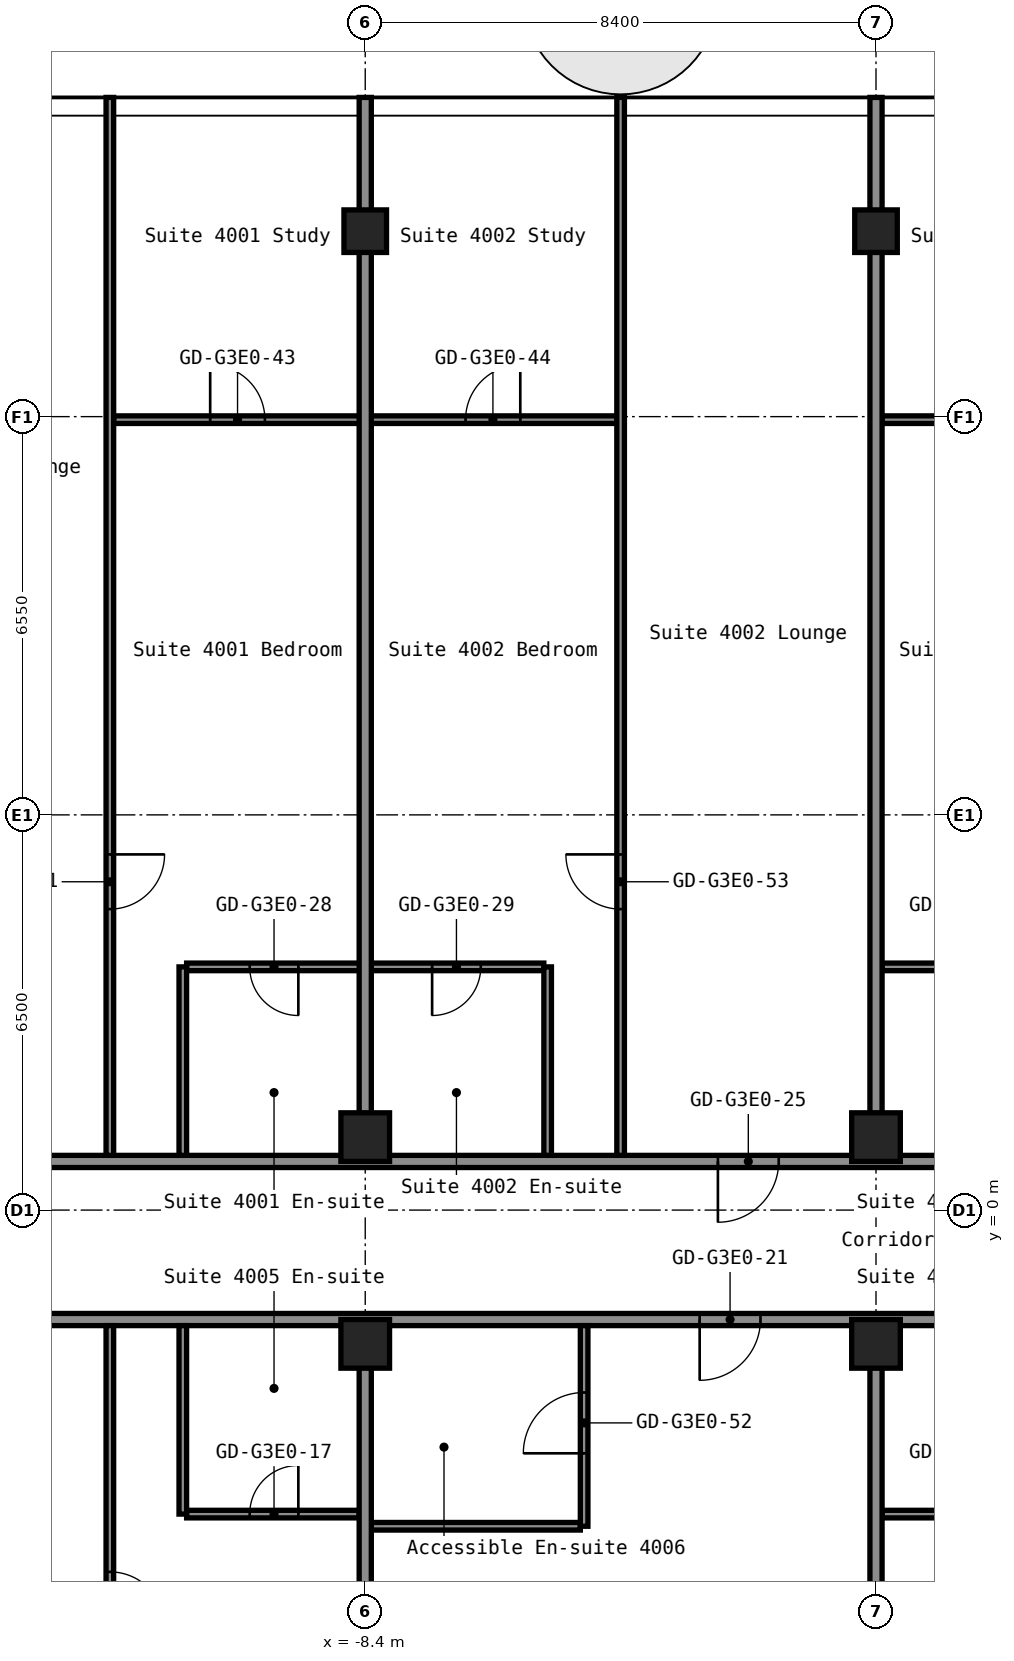
"""IFC4 building model, lengths in metres.
Left out: names, types, materials, properties, quantities, classifications, styles, units other than length and angle.
Written with IfcOpenShell. Run it as: python <this file> out.ifc"""

import sys

from ifc_helpers import new_model, si_unit, direction, frame, frame_2d, origin, origin_2d, place, context, subcontext, project, spatial, rectangle, hollow_rectangle, extrude, element, fill, save


model = new_model("IFC4")
c1 = context("Model", 3, precision=1e-05, world=origin(), true_north=direction((0.0, 1.0)))
c2 = subcontext(c1, "Body", "Model", "MODEL_VIEW")
j1 = project(units=[si_unit("LENGTHUNIT", "METRE"), si_unit("PLANEANGLEUNIT", "RADIAN")], contexts=[c1])
p1 = place(None, origin())
s1 = spatial("IfcSite", under=j1, at=p1, CompositionType="ELEMENT")
p2 = place(p1, origin())
s2 = spatial("IfcBuilding", under=s1, at=p2, CompositionType="ELEMENT")
p3 = place(p2, frame((0.0, 0.0, 143.8)))
s3 = spatial("IfcBuildingStorey", under=s2, at=p3, CompositionType="ELEMENT", Elevation=143.8)
for number, where, z_axis, x_axis in (
    (1, (-8.4, -2.2, 0.0), (0.0, 0.0, 1.0), (1.0, 0.0, 0.0)),
    (2, (-8.4, 1.2, 0.0), (0.0, 0.0, 1.0), (1.0, 0.0, 0.0)),
):
    element("IfcColumn", number, at=place(p3, frame(where, z_axis=z_axis, x_axis=x_axis)), inside=s3, PredefinedType="COLUMN", context=c2, shape_type="SweptSolid", body=[
        extrude(hollow_rectangle(XDim=0.8, YDim=0.8, WallThickness=0.032, at=origin_2d()), origin(), (0.0, 0.0, 1.0), 2.75),
    ])
p4 = place(p3, frame((-8.4, 16.1, 0.0), z_axis=(0.0, 0.0, 1.0), x_axis=(1.0, 0.0, 0.0)))
e3 = element("IfcColumn", 3, at=p4, inside=s3, PredefinedType="COLUMN", context=c2, shape_type="SweptSolid", body=[
    extrude(hollow_rectangle(XDim=0.7, YDim=0.7, WallThickness=0.028, at=origin_2d()), origin(), (0.0, 0.0, 1.0), 2.75),
])
for number, where, z_axis, x_axis in (
    (4, (0.0, -2.2, 0.0), (0.0, 0.0, 1.0), (1.0, 0.0, 0.0)),
    (5, (0.0, 1.2, 0.0), (0.0, 0.0, 1.0), (1.0, 0.0, 0.0)),
):
    element("IfcColumn", number, at=place(p3, frame(where, z_axis=z_axis, x_axis=x_axis)), inside=s3, PredefinedType="COLUMN", context=c2, shape_type="SweptSolid", body=[
        extrude(hollow_rectangle(XDim=0.8, YDim=0.8, WallThickness=0.032, at=origin_2d()), origin(), (0.0, 0.0, 1.0), 2.75),
    ])
p5 = place(p3, frame((0.0, 16.1, 0.0), z_axis=(0.0, 0.0, 1.0), x_axis=(1.0, 0.0, 0.0)))
e6 = element("IfcColumn", 6, at=p5, inside=s3, PredefinedType="COLUMN", context=c2, shape_type="SweptSolid", body=[
    extrude(hollow_rectangle(XDim=0.7, YDim=0.7, WallThickness=0.028, at=origin_2d()), origin(), (0.0, 0.0, 1.0), 2.75),
])
p6 = place(p3, frame((-8.3, -5.2, 0.0), z_axis=(0.0, 0.0, 1.0), x_axis=(1.0, 0.0, 0.0)))
e7 = element("IfcWall", 7, at=p6, inside=s3, PredefinedType="PARTITIONING", context=c2, shape_type="SweptSolid", body=[
    extrude(rectangle(XDim=3.438, YDim=0.125, at=frame_2d((1.719, 0.0))), origin(), (0.0, 0.0, 1.0), 2.75),
])
p7 = place(p3, frame((-11.337, -5.0, 0.0), z_axis=(0.0, 0.0, 1.0), x_axis=(1.0, 0.0, 0.0)))
e8 = element("IfcWall", 8, at=p7, inside=s3, PredefinedType="PARTITIONING", context=c2, shape_type="SweptSolid", body=[
    extrude(rectangle(XDim=2.837, YDim=0.125, at=frame_2d((1.419, 0.0))), origin(), (0.0, 0.0, 1.0), 2.75),
])
p8 = place(p7, frame((1.038, 0.0, 0.0)))
e9 = element("IfcOpeningElement", 9, at=p8, cuts=e8, PredefinedType="OPENING", context=c2, shape_type="SweptSolid", body=[
    extrude(rectangle(XDim=0.8, YDim=2.1, at=frame_2d((0.4, 1.05))), frame((0.0, 0.073, 0.0), z_axis=(0.0, -1.0, 0.0), x_axis=(1.0, 0.0, 0.0)), (0.0, 0.0, 1.0), 0.145),
])
p9 = place(p3, frame((0.1, -5.0, 0.0), z_axis=(0.0, 0.0, 1.0), x_axis=(1.0, 0.0, 0.0)))
e10 = element("IfcWall", 10, at=p9, inside=s3, PredefinedType="PARTITIONING", context=c2, shape_type="SweptSolid", body=[
    extrude(rectangle(XDim=2.837, YDim=0.125, at=frame_2d((1.419, 0.0))), origin(), (0.0, 0.0, 1.0), 2.75),
])
p10 = place(p9, frame((1.0, 0.0, 0.0)))
e11 = element("IfcOpeningElement", 11, at=p10, cuts=e10, PredefinedType="OPENING", context=c2, shape_type="SweptSolid", body=[
    extrude(rectangle(XDim=0.8, YDim=2.1, at=frame_2d((0.4, 1.05))), frame((0.0, 0.073, 0.0), z_axis=(0.0, -1.0, 0.0), x_axis=(1.0, 0.0, 0.0)), (0.0, 0.0, 1.0), 0.145),
])
p11 = place(p3, frame((-16.8, -1.8, 0.0), z_axis=(0.0, 0.0, 1.0), x_axis=(1.0, 0.0, 0.0)))
e12 = element("IfcWall", 12, at=p11, inside=s3, PredefinedType="PARTITIONING", context=c2, shape_type="SweptSolid", body=[
    extrude(rectangle(XDim=33.6, YDim=0.2, at=frame_2d((16.8, 0.0))), origin(), (0.0, 0.0, 1.0), 2.75),
])
p12 = place(p11, frame((1.6, 0.0, 0.0)))
e13 = element("IfcOpeningElement", 13, at=p12, cuts=e12, PredefinedType="OPENING", context=c2, shape_type="SweptSolid", body=[
    extrude(rectangle(XDim=1.0, YDim=2.1, at=frame_2d((0.5, 1.05))), frame((0.0, 0.11, 0.0), z_axis=(0.0, -1.0, 0.0), x_axis=(1.0, 0.0, 0.0)), (0.0, 0.0, 1.0), 0.22),
])
p13 = place(p11, frame((13.9, 0.0, 0.0)))
e14 = element("IfcOpeningElement", 14, at=p13, cuts=e12, PredefinedType="OPENING", context=c2, shape_type="SweptSolid", body=[
    extrude(rectangle(XDim=1.0, YDim=2.1, at=frame_2d((0.5, 1.05))), frame((0.0, 0.11, 0.0), z_axis=(0.0, -1.0, 0.0), x_axis=(1.0, 0.0, 0.0)), (0.0, 0.0, 1.0), 0.22),
])
p14 = place(p11, frame((22.6, 0.0, 0.0)))
e15 = element("IfcOpeningElement", 15, at=p14, cuts=e12, PredefinedType="OPENING", context=c2, shape_type="SweptSolid", body=[
    extrude(rectangle(XDim=1.0, YDim=2.1, at=frame_2d((0.5, 1.05))), frame((0.0, 0.11, 0.0), z_axis=(0.0, -1.0, 0.0), x_axis=(1.0, 0.0, 0.0)), (0.0, 0.0, 1.0), 0.22),
])
p15 = place(p11, frame((26.8, 0.0, 0.0)))
e16 = element("IfcOpeningElement", 16, at=p15, cuts=e12, PredefinedType="OPENING", context=c2, shape_type="SweptSolid", body=[
    extrude(rectangle(XDim=1.0, YDim=2.1, at=frame_2d((0.5, 1.05))), frame((0.0, 0.11, 0.0), z_axis=(0.0, -1.0, 0.0), x_axis=(1.0, 0.0, 0.0)), (0.0, 0.0, 1.0), 0.22),
])
p16 = place(p3, frame((-16.8, 0.8, 0.0), z_axis=(0.0, 0.0, 1.0), x_axis=(1.0, 0.0, 0.0)))
e17 = element("IfcWall", 17, at=p16, inside=s3, PredefinedType="PARTITIONING", context=c2, shape_type="SweptSolid", body=[
    extrude(rectangle(XDim=33.6, YDim=0.2, at=frame_2d((16.8, 0.0))), origin(), (0.0, 0.0, 1.0), 2.75),
])
p17 = place(p16, frame((1.6, 0.0, 0.0)))
e18 = element("IfcOpeningElement", 18, at=p17, cuts=e17, PredefinedType="OPENING", context=c2, shape_type="SweptSolid", body=[
    extrude(rectangle(XDim=1.0, YDim=2.1, at=frame_2d((0.5, 1.05))), frame((0.0, 0.11, 0.0), z_axis=(0.0, -1.0, 0.0), x_axis=(1.0, 0.0, 0.0)), (0.0, 0.0, 1.0), 0.22),
])
p18 = place(p16, frame((14.2, 0.0, 0.0)))
e19 = element("IfcOpeningElement", 19, at=p18, cuts=e17, PredefinedType="OPENING", context=c2, shape_type="SweptSolid", body=[
    extrude(rectangle(XDim=1.0, YDim=2.1, at=frame_2d((0.5, 1.05))), frame((0.0, 0.11, 0.0), z_axis=(0.0, -1.0, 0.0), x_axis=(1.0, 0.0, 0.0)), (0.0, 0.0, 1.0), 0.22),
])
p19 = place(p16, frame((22.6, 0.0, 0.0)))
e20 = element("IfcOpeningElement", 20, at=p19, cuts=e17, PredefinedType="OPENING", context=c2, shape_type="SweptSolid", body=[
    extrude(rectangle(XDim=1.0, YDim=2.1, at=frame_2d((0.5, 1.05))), frame((0.0, 0.11, 0.0), z_axis=(0.0, -1.0, 0.0), x_axis=(1.0, 0.0, 0.0)), (0.0, 0.0, 1.0), 0.22),
])
p20 = place(p16, frame((26.8, 0.0, 0.0)))
e21 = element("IfcOpeningElement", 21, at=p20, cuts=e17, PredefinedType="OPENING", context=c2, shape_type="SweptSolid", body=[
    extrude(rectangle(XDim=1.0, YDim=2.1, at=frame_2d((0.5, 1.05))), frame((0.0, 0.11, 0.0), z_axis=(0.0, -1.0, 0.0), x_axis=(1.0, 0.0, 0.0)), (0.0, 0.0, 1.0), 0.22),
])
p21 = place(p3, frame((-11.337, 4.0, 0.0), z_axis=(0.0, 0.0, 1.0), x_axis=(1.0, 0.0, 0.0)))
e22 = element("IfcWall", 22, at=p21, inside=s3, PredefinedType="PARTITIONING", context=c2, shape_type="SweptSolid", body=[
    extrude(rectangle(XDim=5.875, YDim=0.125, at=frame_2d((2.938, 0.0))), origin(), (0.0, 0.0, 1.0), 2.75),
])
p22 = place(p21, frame((1.038, 0.0, 0.0)))
e23 = element("IfcOpeningElement", 23, at=p22, cuts=e22, PredefinedType="OPENING", context=c2, shape_type="SweptSolid", body=[
    extrude(rectangle(XDim=0.8, YDim=2.1, at=frame_2d((0.4, 1.05))), frame((0.0, 0.073, 0.0), z_axis=(0.0, -1.0, 0.0), x_axis=(1.0, 0.0, 0.0)), (0.0, 0.0, 1.0), 0.145),
])
p23 = place(p21, frame((4.038, 0.0, 0.0)))
e24 = element("IfcOpeningElement", 24, at=p23, cuts=e22, PredefinedType="OPENING", context=c2, shape_type="SweptSolid", body=[
    extrude(rectangle(XDim=0.8, YDim=2.1, at=frame_2d((0.4, 1.05))), frame((0.0, 0.073, 0.0), z_axis=(0.0, -1.0, 0.0), x_axis=(1.0, 0.0, 0.0)), (0.0, 0.0, 1.0), 0.145),
])
p24 = place(p3, frame((0.1, 4.0, 0.0), z_axis=(0.0, 0.0, 1.0), x_axis=(1.0, 0.0, 0.0)))
e25 = element("IfcWall", 25, at=p24, inside=s3, PredefinedType="PARTITIONING", context=c2, shape_type="SweptSolid", body=[
    extrude(rectangle(XDim=2.837, YDim=0.125, at=frame_2d((1.419, 0.0))), origin(), (0.0, 0.0, 1.0), 2.75),
])
p25 = place(p24, frame((1.0, 0.0, 0.0)))
e26 = element("IfcOpeningElement", 26, at=p25, cuts=e25, PredefinedType="OPENING", context=c2, shape_type="SweptSolid", body=[
    extrude(rectangle(XDim=0.8, YDim=2.1, at=frame_2d((0.4, 1.05))), frame((0.0, 0.073, 0.0), z_axis=(0.0, -1.0, 0.0), x_axis=(1.0, 0.0, 0.0)), (0.0, 0.0, 1.0), 0.145),
])
p26 = place(p3, frame((-12.538, 13.0, 0.0), z_axis=(0.0, 0.0, 1.0), x_axis=(1.0, 0.0, 0.0)))
e27 = element("IfcWall", 27, at=p26, inside=s3, PredefinedType="PARTITIONING", context=c2, shape_type="SweptSolid", body=[
    extrude(rectangle(XDim=8.275, YDim=0.125, at=frame_2d((4.138, 0.0))), origin(), (0.0, 0.0, 1.0), 2.75),
])
p27 = place(p26, frame((1.587, 0.0, 0.0)))
e28 = element("IfcOpeningElement", 28, at=p27, cuts=e27, PredefinedType="OPENING", context=c2, shape_type="SweptSolid", body=[
    extrude(rectangle(XDim=0.9, YDim=2.1, at=frame_2d((0.45, 1.05))), frame((0.0, 0.073, 0.0), z_axis=(0.0, -1.0, 0.0), x_axis=(1.0, 0.0, 0.0)), (0.0, 0.0, 1.0), 0.145),
])
p28 = place(p26, frame((5.788, 0.0, 0.0)))
e29 = element("IfcOpeningElement", 29, at=p28, cuts=e27, PredefinedType="OPENING", context=c2, shape_type="SweptSolid", body=[
    extrude(rectangle(XDim=0.9, YDim=2.1, at=frame_2d((0.45, 1.05))), frame((0.0, 0.073, 0.0), z_axis=(0.0, -1.0, 0.0), x_axis=(1.0, 0.0, 0.0)), (0.0, 0.0, 1.0), 0.145),
])
p29 = place(p3, frame((0.1, 13.0, 0.0), z_axis=(0.0, 0.0, 1.0), x_axis=(1.0, 0.0, 0.0)))
e30 = element("IfcWall", 30, at=p29, inside=s3, PredefinedType="PARTITIONING", context=c2, shape_type="SweptSolid", body=[
    extrude(rectangle(XDim=4.037, YDim=0.125, at=frame_2d((2.019, 0.0))), origin(), (0.0, 0.0, 1.0), 2.75),
])
p30 = place(p29, frame((1.55, 0.0, 0.0)))
e31 = element("IfcOpeningElement", 31, at=p30, cuts=e30, PredefinedType="OPENING", context=c2, shape_type="SweptSolid", body=[
    extrude(rectangle(XDim=0.9, YDim=2.1, at=frame_2d((0.45, 1.05))), frame((0.0, 0.073, 0.0), z_axis=(0.0, -1.0, 0.0), x_axis=(1.0, 0.0, 0.0)), (0.0, 0.0, 1.0), 0.145),
])
p31 = place(p3, frame((-12.6, -19.3, 0.0), z_axis=(0.0, 0.0, 1.0), x_axis=(0.0, 1.0, 0.0)))
e32 = element("IfcWall", 32, at=p31, inside=s3, PredefinedType="PARTITIONING", context=c2, shape_type="SweptSolid", body=[
    extrude(rectangle(XDim=17.4, YDim=0.125, at=frame_2d((8.7, 0.0))), origin(), (0.0, 0.0, 1.0), 2.75),
])
p32 = place(p31, frame((12.45, 0.0, 0.0)))
e33 = element("IfcOpeningElement", 33, at=p32, cuts=e32, PredefinedType="OPENING", context=c2, shape_type="SweptSolid", body=[
    extrude(rectangle(XDim=0.9, YDim=2.1, at=frame_2d((0.45, 1.05))), frame((0.0, 0.073, 0.0), z_axis=(0.0, -1.0, 0.0), x_axis=(1.0, 0.0, 0.0)), (0.0, 0.0, 1.0), 0.145),
])
p33 = place(p3, frame((-12.6, 0.9, 0.0), z_axis=(0.0, 0.0, 1.0), x_axis=(0.0, 1.0, 0.0)))
e34 = element("IfcWall", 34, at=p33, inside=s3, PredefinedType="PARTITIONING", context=c2, shape_type="SweptSolid", body=[
    extrude(rectangle(XDim=17.4, YDim=0.125, at=frame_2d((8.7, 0.0))), origin(), (0.0, 0.0, 1.0), 2.75),
])
p34 = place(p33, frame((4.05, 0.0, 0.0)))
e35 = element("IfcOpeningElement", 35, at=p34, cuts=e34, PredefinedType="OPENING", context=c2, shape_type="SweptSolid", body=[
    extrude(rectangle(XDim=0.9, YDim=2.1, at=frame_2d((0.45, 1.05))), frame((0.0, 0.073, 0.0), z_axis=(0.0, -1.0, 0.0), x_axis=(1.0, 0.0, 0.0)), (0.0, 0.0, 1.0), 0.145),
])
for number, where, z_axis, x_axis in (
    (36, (-11.4, -5.0, 0.0), (0.0, 0.0, 1.0), (0.0, 1.0, 0.0)),
    (37, (-11.4, 0.9, 0.0), (0.0, 0.0, 1.0), (0.0, 1.0, 0.0)),
):
    element("IfcWall", number, at=place(p3, frame(where, z_axis=z_axis, x_axis=x_axis)), inside=s3, PredefinedType="PARTITIONING", context=c2, shape_type="SweptSolid", body=[
        extrude(rectangle(XDim=3.1, YDim=0.125, at=frame_2d((1.55, 0.0))), origin(), (0.0, 0.0, 1.0), 2.75),
    ])
for number, where, z_axis, x_axis in (
    (38, (-8.4, -19.3, 0.0), (0.0, 0.0, 1.0), (0.0, 1.0, 0.0)),
    (39, (-8.4, 1.59, 0.0), (0.0, 0.0, 1.0), (0.0, 1.0, 0.0)),
):
    element("IfcWall", number, at=place(p3, frame(where, z_axis=z_axis, x_axis=x_axis)), inside=s3, PredefinedType="PARTITIONING", context=c2, shape_type="SweptSolid", body=[
        extrude(rectangle(XDim=16.71, YDim=0.2, at=frame_2d((8.355, 0.0))), origin(), (0.0, 0.0, 1.0), 2.75),
    ])
p35 = place(p3, frame((-5.4, 0.9, 0.0), z_axis=(0.0, 0.0, 1.0), x_axis=(0.0, 1.0, 0.0)))
e40 = element("IfcWall", 40, at=p35, inside=s3, PredefinedType="PARTITIONING", context=c2, shape_type="SweptSolid", body=[
    extrude(rectangle(XDim=3.1, YDim=0.125, at=frame_2d((1.55, 0.0))), origin(), (0.0, 0.0, 1.0), 2.75),
])
p36 = place(p3, frame((-4.8, -5.2, 0.0), z_axis=(0.0, 0.0, 1.0), x_axis=(0.0, 1.0, 0.0)))
e41 = element("IfcWall", 41, at=p36, inside=s3, PredefinedType="PARTITIONING", context=c2, shape_type="SweptSolid", body=[
    extrude(rectangle(XDim=3.3, YDim=0.125, at=frame_2d((1.65, 0.0))), origin(), (0.0, 0.0, 1.0), 2.75),
])
p37 = place(p36, frame((1.2, 0.0, 0.0)))
e42 = element("IfcOpeningElement", 42, at=p37, cuts=e41, PredefinedType="OPENING", context=c2, shape_type="SweptSolid", body=[
    extrude(rectangle(XDim=1.0, YDim=2.1, at=frame_2d((0.5, 1.05))), frame((0.0, 0.073, 0.0), z_axis=(0.0, -1.0, 0.0), x_axis=(1.0, 0.0, 0.0)), (0.0, 0.0, 1.0), 0.145),
])
p38 = place(p3, frame((-4.2, 0.9, 0.0), z_axis=(0.0, 0.0, 1.0), x_axis=(0.0, 1.0, 0.0)))
e43 = element("IfcWall", 43, at=p38, inside=s3, PredefinedType="PARTITIONING", context=c2, shape_type="SweptSolid", body=[
    extrude(rectangle(XDim=17.4, YDim=0.125, at=frame_2d((8.7, 0.0))), origin(), (0.0, 0.0, 1.0), 2.75),
])
p39 = place(p38, frame((4.05, 0.0, 0.0)))
e44 = element("IfcOpeningElement", 44, at=p39, cuts=e43, PredefinedType="OPENING", context=c2, shape_type="SweptSolid", body=[
    extrude(rectangle(XDim=0.9, YDim=2.1, at=frame_2d((0.45, 1.05))), frame((0.0, 0.073, 0.0), z_axis=(0.0, -1.0, 0.0), x_axis=(1.0, 0.0, 0.0)), (0.0, 0.0, 1.0), 0.145),
])
for number, where, z_axis, x_axis in (
    (45, (0.0, -19.3, 0.0), (0.0, 0.0, 1.0), (0.0, 1.0, 0.0)),
    (46, (0.0, 1.59, 0.0), (0.0, 0.0, 1.0), (0.0, 1.0, 0.0)),
):
    element("IfcWall", number, at=place(p3, frame(where, z_axis=z_axis, x_axis=x_axis)), inside=s3, PredefinedType="PARTITIONING", context=c2, shape_type="SweptSolid", body=[
        extrude(rectangle(XDim=16.71, YDim=0.2, at=frame_2d((8.355, 0.0))), origin(), (0.0, 0.0, 1.0), 2.75),
    ])
p40 = place(p8, origin())
e47 = element("IfcDoor", 47, at=p40, inside=s3, OperationType="SINGLE_SWING_LEFT", PredefinedType="DOOR", context=c2, shape_type="SweptSolid", body=[
    extrude(rectangle(XDim=0.8, YDim=2.1, at=frame_2d((0.4, 1.05))), frame((0.0, 0.025, 0.0), z_axis=(0.0, -1.0, 0.0), x_axis=(1.0, 0.0, 0.0)), (0.0, 0.0, 1.0), 0.05),
])
fill(e9, e47)
p41 = place(p13, origin())
e48 = element("IfcDoor", 48, at=p41, inside=s3, OperationType="SINGLE_SWING_LEFT", PredefinedType="DOOR", context=c2, shape_type="SweptSolid", body=[
    extrude(rectangle(XDim=1.0, YDim=2.1, at=frame_2d((0.5, 1.05))), frame((0.0, 0.025, 0.0), z_axis=(0.0, -1.0, 0.0), x_axis=(1.0, 0.0, 0.0)), (0.0, 0.0, 1.0), 0.05),
])
fill(e14, e48)
p42 = place(p18, origin())
e49 = element("IfcDoor", 49, at=p42, inside=s3, OperationType="SINGLE_SWING_LEFT", PredefinedType="DOOR", context=c2, shape_type="SweptSolid", body=[
    extrude(rectangle(XDim=1.0, YDim=2.1, at=frame_2d((0.5, 1.05))), frame((0.0, 0.025, 0.0), z_axis=(0.0, -1.0, 0.0), x_axis=(1.0, 0.0, 0.0)), (0.0, 0.0, 1.0), 0.05),
])
fill(e19, e49)
p43 = place(p22, origin())
e50 = element("IfcDoor", 50, at=p43, inside=s3, OperationType="SINGLE_SWING_RIGHT", PredefinedType="DOOR", context=c2, shape_type="SweptSolid", body=[
    extrude(rectangle(XDim=0.8, YDim=2.1, at=frame_2d((0.4, 1.05))), frame((0.0, 0.025, 0.0), z_axis=(0.0, -1.0, 0.0), x_axis=(1.0, 0.0, 0.0)), (0.0, 0.0, 1.0), 0.05),
])
fill(e23, e50)
p44 = place(p23, origin())
e51 = element("IfcDoor", 51, at=p44, inside=s3, OperationType="SINGLE_SWING_LEFT", PredefinedType="DOOR", context=c2, shape_type="SweptSolid", body=[
    extrude(rectangle(XDim=0.8, YDim=2.1, at=frame_2d((0.4, 1.05))), frame((0.0, 0.025, 0.0), z_axis=(0.0, -1.0, 0.0), x_axis=(1.0, 0.0, 0.0)), (0.0, 0.0, 1.0), 0.05),
])
fill(e24, e51)
p45 = place(p27, origin())
e52 = element("IfcDoor", 52, at=p45, inside=s3, OperationType="SINGLE_SWING_RIGHT", PredefinedType="DOOR", context=c2, shape_type="SweptSolid", body=[
    extrude(rectangle(XDim=0.9, YDim=2.1, at=frame_2d((0.45, 1.05))), frame((0.0, 0.025, 0.0), z_axis=(0.0, -1.0, 0.0), x_axis=(1.0, 0.0, 0.0)), (0.0, 0.0, 1.0), 0.05),
])
fill(e28, e52)
p46 = place(p28, origin())
e53 = element("IfcDoor", 53, at=p46, inside=s3, OperationType="SINGLE_SWING_LEFT", PredefinedType="DOOR", context=c2, shape_type="SweptSolid", body=[
    extrude(rectangle(XDim=0.9, YDim=2.1, at=frame_2d((0.45, 1.05))), frame((0.0, 0.025, 0.0), z_axis=(0.0, -1.0, 0.0), x_axis=(1.0, 0.0, 0.0)), (0.0, 0.0, 1.0), 0.05),
])
fill(e29, e53)
p47 = place(p32, origin())
e54 = element("IfcDoor", 54, at=p47, inside=s3, OperationType="SINGLE_SWING_LEFT", PredefinedType="DOOR", context=c2, shape_type="SweptSolid", body=[
    extrude(rectangle(XDim=0.9, YDim=2.1, at=frame_2d((0.45, 1.05))), frame((0.0, 0.025, 0.0), z_axis=(0.0, -1.0, 0.0), x_axis=(1.0, 0.0, 0.0)), (0.0, 0.0, 1.0), 0.05),
])
fill(e33, e54)
p48 = place(p34, origin())
e55 = element("IfcDoor", 55, at=p48, inside=s3, OperationType="SINGLE_SWING_RIGHT", PredefinedType="DOOR", context=c2, shape_type="SweptSolid", body=[
    extrude(rectangle(XDim=0.9, YDim=2.1, at=frame_2d((0.45, 1.05))), frame((0.0, 0.025, 0.0), z_axis=(0.0, -1.0, 0.0), x_axis=(1.0, 0.0, 0.0)), (0.0, 0.0, 1.0), 0.05),
])
fill(e35, e55)
p49 = place(p37, origin())
e56 = element("IfcDoor", 56, at=p49, inside=s3, OperationType="SINGLE_SWING_RIGHT", PredefinedType="DOOR", context=c2, shape_type="SweptSolid", body=[
    extrude(rectangle(XDim=1.0, YDim=2.1, at=frame_2d((0.5, 1.05))), frame((0.0, 0.025, 0.0), z_axis=(0.0, -1.0, 0.0), x_axis=(1.0, 0.0, 0.0)), (0.0, 0.0, 1.0), 0.05),
])
fill(e42, e56)
p50 = place(p39, origin())
e57 = element("IfcDoor", 57, at=p50, inside=s3, OperationType="SINGLE_SWING_LEFT", PredefinedType="DOOR", context=c2, shape_type="SweptSolid", body=[
    extrude(rectangle(XDim=0.9, YDim=2.1, at=frame_2d((0.45, 1.05))), frame((0.0, 0.025, 0.0), z_axis=(0.0, -1.0, 0.0), x_axis=(1.0, 0.0, 0.0)), (0.0, 0.0, 1.0), 0.05),
])
fill(e44, e57)
save(model, sys.argv[1])
